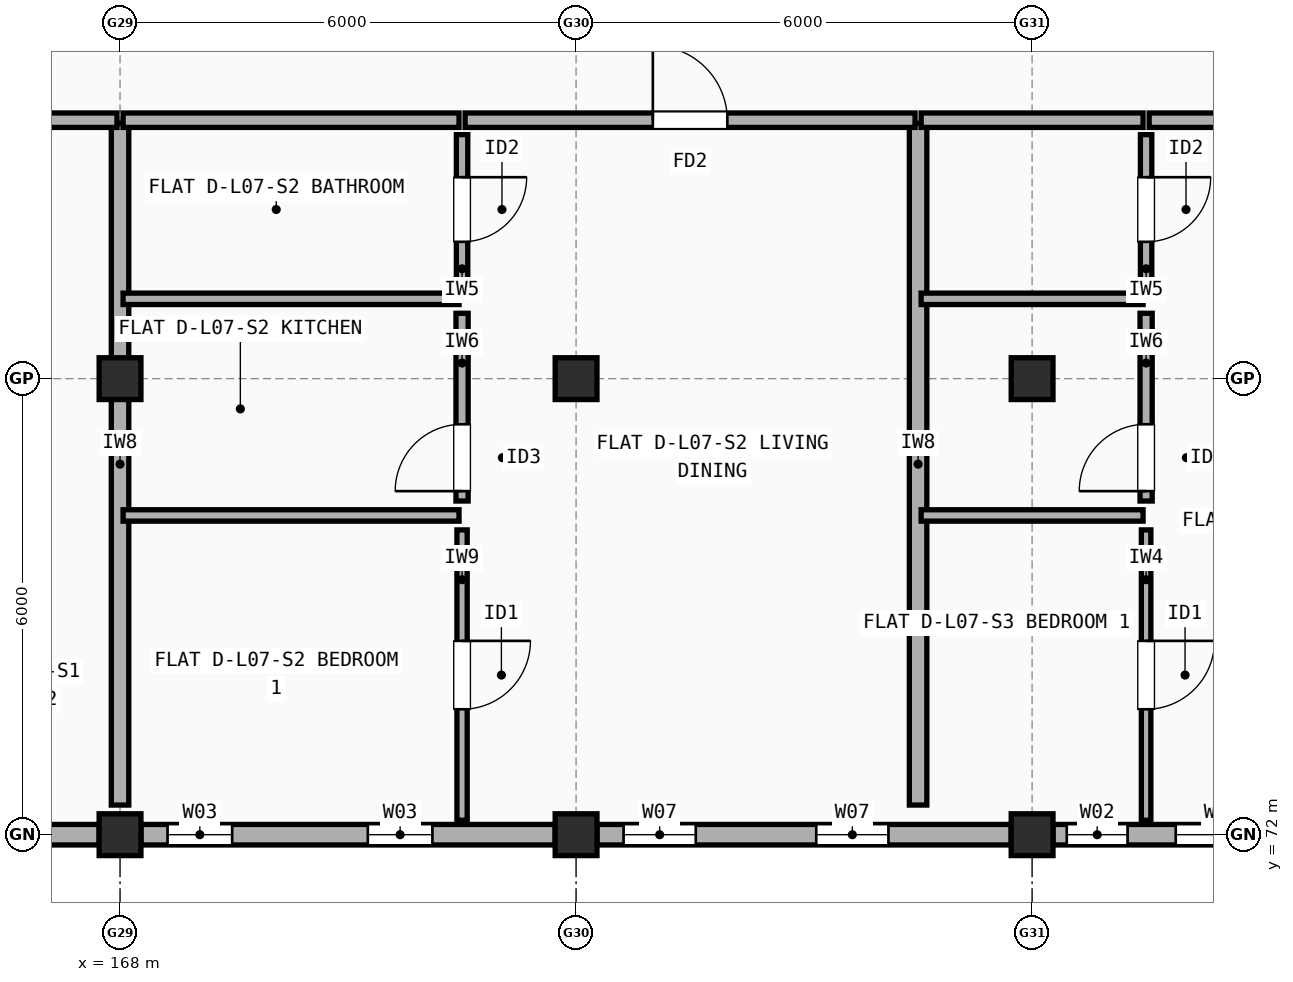
"""IFC4 building model, lengths in metres.
Left out: names, types, materials, properties, quantities, classifications, styles, units other than length and angle.
Written with IfcOpenShell. Run it as: python <this file> out.ifc"""

import sys

from ifc_helpers import new_model, si_unit, direction, frame, frame_2d, origin, origin_2d, place, context, subcontext, project, spatial, rectangle, extrude, element, fill, save


model = new_model("IFC4")
c1 = context("Model", 3, precision=1e-05, world=origin(), true_north=direction((0.0, 1.0)))
c2 = subcontext(c1, "Body", "Model", "MODEL_VIEW")
j1 = project(units=[si_unit("LENGTHUNIT", "METRE"), si_unit("PLANEANGLEUNIT", "RADIAN")], contexts=[c1])
p1 = place(None, origin())
s1 = spatial("IfcSite", under=j1, at=p1, CompositionType="ELEMENT")
p2 = place(p1, origin())
s2 = spatial("IfcBuilding", under=s1, at=p2, CompositionType="ELEMENT")
p3 = place(p2, frame((0.0, 0.0, 23.7)))
s3 = spatial("IfcBuildingStorey", under=s2, at=p3, CompositionType="ELEMENT", Elevation=23.7)
for number, where, z_axis, x_axis in (
    (1, (168.0, 72.0, 0.0), (0.0, 0.0, 1.0), (1.0, 0.0, 0.0)),
    (2, (168.0, 78.0, 0.0), (0.0, 0.0, 1.0), (1.0, 0.0, 0.0)),
    (3, (174.0, 72.0, 0.0), (0.0, 0.0, 1.0), (1.0, 0.0, 0.0)),
    (4, (174.0, 78.0, 0.0), (0.0, 0.0, 1.0), (1.0, 0.0, 0.0)),
    (5, (180.0, 72.0, 0.0), (0.0, 0.0, 1.0), (1.0, 0.0, 0.0)),
    (6, (180.0, 78.0, 0.0), (0.0, 0.0, 1.0), (1.0, 0.0, 0.0)),
):
    element("IfcColumn", number, at=place(p3, frame(where, z_axis=z_axis, x_axis=x_axis)), inside=s3, PredefinedType="COLUMN", context=c2, shape_type="SweptSolid", body=[
        extrude(rectangle(XDim=0.55, YDim=0.55, at=origin_2d()), origin(), (0.0, 0.0, 1.0), 2.975),
    ])
p4 = place(p3, frame((162.275, 72.0, 0.0), z_axis=(0.0, 0.0, 1.0), x_axis=(1.0, 0.0, 0.0)))
e7 = element("IfcWall", 7, at=p4, inside=s3, PredefinedType="STANDARD", context=c2, shape_type="SweptSolid", body=[
    extrude(rectangle(XDim=5.45, YDim=0.27, at=frame_2d((2.725, 0.0))), origin(), (0.0, 0.0, 1.0), 2.457),
])
p5 = place(p4, frame((0.742, 0.0, 0.9)))
e8 = element("IfcOpeningElement", 8, at=p5, cuts=e7, PredefinedType="OPENING", context=c2, shape_type="SweptSolid", body=[
    extrude(rectangle(XDim=1.2, YDim=1.35, at=frame_2d((0.6, 0.675))), frame((0.0, 0.145, 0.0), z_axis=(0.0, -1.0, 0.0), x_axis=(1.0, 0.0, 0.0)), (0.0, 0.0, 1.0), 0.29),
])
p6 = place(p4, frame((3.708, 0.0, 0.9)))
e9 = element("IfcOpeningElement", 9, at=p6, cuts=e7, PredefinedType="OPENING", context=c2, shape_type="SweptSolid", body=[
    extrude(rectangle(XDim=0.8, YDim=1.2, at=frame_2d((0.4, 0.6))), frame((0.0, 0.145, 0.0), z_axis=(0.0, -1.0, 0.0), x_axis=(1.0, 0.0, 0.0)), (0.0, 0.0, 1.0), 0.29),
])
p7 = place(p3, frame((168.275, 72.0, 0.0), z_axis=(0.0, 0.0, 1.0), x_axis=(1.0, 0.0, 0.0)))
e10 = element("IfcWall", 10, at=p7, inside=s3, PredefinedType="STANDARD", context=c2, shape_type="SweptSolid", body=[
    extrude(rectangle(XDim=5.45, YDim=0.27, at=frame_2d((2.725, 0.0))), origin(), (0.0, 0.0, 1.0), 2.457),
])
p8 = place(p7, frame((0.35, 0.0, 0.9)))
e11 = element("IfcOpeningElement", 11, at=p8, cuts=e10, PredefinedType="OPENING", context=c2, shape_type="SweptSolid", body=[
    extrude(rectangle(XDim=0.85, YDim=1.25, at=frame_2d((0.425, 0.625))), frame((0.0, 0.145, 0.0), z_axis=(0.0, -1.0, 0.0), x_axis=(1.0, 0.0, 0.0)), (0.0, 0.0, 1.0), 0.29),
])
p9 = place(p7, frame((2.985, 0.0, 0.9)))
e12 = element("IfcOpeningElement", 12, at=p9, cuts=e10, PredefinedType="OPENING", context=c2, shape_type="SweptSolid", body=[
    extrude(rectangle(XDim=0.85, YDim=1.25, at=frame_2d((0.425, 0.625))), frame((0.0, 0.145, 0.0), z_axis=(0.0, -1.0, 0.0), x_axis=(1.0, 0.0, 0.0)), (0.0, 0.0, 1.0), 0.29),
])
p10 = place(p3, frame((174.275, 72.0, 0.0), z_axis=(0.0, 0.0, 1.0), x_axis=(1.0, 0.0, 0.0)))
e13 = element("IfcWall", 13, at=p10, inside=s3, PredefinedType="STANDARD", context=c2, shape_type="SweptSolid", body=[
    extrude(rectangle(XDim=5.45, YDim=0.27, at=frame_2d((2.725, 0.0))), origin(), (0.0, 0.0, 1.0), 2.457),
])
p11 = place(p10, frame((0.35, 0.0, 0.9)))
e14 = element("IfcOpeningElement", 14, at=p11, cuts=e13, PredefinedType="OPENING", context=c2, shape_type="SweptSolid", body=[
    extrude(rectangle(XDim=0.95, YDim=1.35, at=frame_2d((0.475, 0.675))), frame((0.0, 0.145, 0.0), z_axis=(0.0, -1.0, 0.0), x_axis=(1.0, 0.0, 0.0)), (0.0, 0.0, 1.0), 0.29),
])
p12 = place(p10, frame((2.885, 0.0, 0.9)))
e15 = element("IfcOpeningElement", 15, at=p12, cuts=e13, PredefinedType="OPENING", context=c2, shape_type="SweptSolid", body=[
    extrude(rectangle(XDim=0.95, YDim=1.35, at=frame_2d((0.475, 0.675))), frame((0.0, 0.145, 0.0), z_axis=(0.0, -1.0, 0.0), x_axis=(1.0, 0.0, 0.0)), (0.0, 0.0, 1.0), 0.29),
])
p13 = place(p3, frame((180.275, 72.0, 0.0), z_axis=(0.0, 0.0, 1.0), x_axis=(1.0, 0.0, 0.0)))
e16 = element("IfcWall", 16, at=p13, inside=s3, PredefinedType="STANDARD", context=c2, shape_type="SweptSolid", body=[
    extrude(rectangle(XDim=5.475, YDim=0.27, at=frame_2d((2.738, 0.0))), origin(), (0.0, 0.0, 1.0), 2.457),
])
p14 = place(p13, frame((1.615, 0.0, 0.9)))
e17 = element("IfcOpeningElement", 17, at=p14, cuts=e16, PredefinedType="OPENING", context=c2, shape_type="SweptSolid", body=[
    extrude(rectangle(XDim=1.2, YDim=1.35, at=frame_2d((0.6, 0.675))), frame((0.0, 0.145, 0.0), z_axis=(0.0, -1.0, 0.0), x_axis=(1.0, 0.0, 0.0)), (0.0, 0.0, 1.0), 0.29),
])
p15 = place(p13, frame((3.925, 0.0, 0.9)))
e18 = element("IfcOpeningElement", 18, at=p15, cuts=e16, PredefinedType="OPENING", context=c2, shape_type="SweptSolid", body=[
    extrude(rectangle(XDim=1.2, YDim=1.35, at=frame_2d((0.6, 0.675))), frame((0.0, 0.145, 0.0), z_axis=(0.0, -1.0, 0.0), x_axis=(1.0, 0.0, 0.0)), (0.0, 0.0, 1.0), 0.29),
])
p16 = place(p13, frame((0.181, 0.0, 0.9)))
e19 = element("IfcOpeningElement", 19, at=p16, cuts=e16, PredefinedType="OPENING", context=c2, shape_type="SweptSolid", body=[
    extrude(rectangle(XDim=0.8, YDim=1.2, at=frame_2d((0.4, 0.6))), frame((0.0, 0.145, 0.0), z_axis=(0.0, -1.0, 0.0), x_axis=(1.0, 0.0, 0.0)), (0.0, 0.0, 1.0), 0.29),
])
p17 = place(p3, frame((168.0, 72.39, 0.0), z_axis=(0.0, 0.0, 1.0), x_axis=(0.0, 1.0, 0.0)))
e20 = element("IfcWall", 20, at=p17, inside=s3, PredefinedType="SOLIDWALL", context=c2, shape_type="SweptSolid", body=[
    extrude(rectangle(XDim=8.97, YDim=0.23, at=frame_2d((4.485, 0.0))), origin(), (0.0, 0.0, 1.0), 2.508),
])
p18 = place(p3, frame((165.04, 81.4, 0.0), z_axis=(0.0, 0.0, 1.0), x_axis=(1.0, 0.0, 0.0)))
e21 = element("IfcWall", 21, at=p18, inside=s3, PredefinedType="SOLIDWALL", context=c2, shape_type="SweptSolid", body=[
    extrude(rectangle(XDim=2.92, YDim=0.19, at=frame_2d((1.46, 0.0))), origin(), (0.0, 0.0, 1.0), 2.508),
])
p19 = place(p3, frame((178.5, 72.39, 0.0), z_axis=(0.0, 0.0, 1.0), x_axis=(0.0, 1.0, 0.0)))
e22 = element("IfcWall", 22, at=p19, inside=s3, PredefinedType="SOLIDWALL", context=c2, shape_type="SweptSolid", body=[
    extrude(rectangle(XDim=8.97, YDim=0.23, at=frame_2d((4.485, 0.0))), origin(), (0.0, 0.0, 1.0), 2.457),
])
p20 = place(p3, frame((168.04, 81.4, 0.0), z_axis=(0.0, 0.0, 1.0), x_axis=(1.0, 0.0, 0.0)))
e23 = element("IfcWall", 23, at=p20, inside=s3, PredefinedType="SOLIDWALL", context=c2, shape_type="SweptSolid", body=[
    extrude(rectangle(XDim=4.42, YDim=0.19, at=frame_2d((2.21, 0.0))), origin(), (0.0, 0.0, 1.0), 2.508),
])
p21 = place(p3, frame((172.54, 81.4, 0.0), z_axis=(0.0, 0.0, 1.0), x_axis=(1.0, 0.0, 0.0)))
e24 = element("IfcWall", 24, at=p21, inside=s3, PredefinedType="SOLIDWALL", context=c2, shape_type="SweptSolid", body=[
    extrude(rectangle(XDim=5.92, YDim=0.19, at=frame_2d((2.96, 0.0))), origin(), (0.0, 0.0, 1.0), 2.458),
])
p22 = place(p21, frame((2.47, 0.0, 0.0)))
e25 = element("IfcOpeningElement", 25, at=p22, cuts=e24, PredefinedType="OPENING", context=c2, shape_type="SweptSolid", body=[
    extrude(rectangle(XDim=0.98, YDim=2.15, at=frame_2d((0.49, 1.075))), frame((0.0, 0.105, 0.0), z_axis=(0.0, -1.0, 0.0), x_axis=(1.0, 0.0, 0.0)), (0.0, 0.0, 1.0), 0.21),
])
p23 = place(p3, frame((172.5, 72.19, 0.0), z_axis=(0.0, 0.0, 1.0), x_axis=(0.0, 1.0, 0.0)))
e26 = element("IfcWall", 26, at=p23, inside=s3, PredefinedType="PARTITIONING", context=c2, shape_type="SweptSolid", body=[
    extrude(rectangle(XDim=3.82, YDim=0.135, at=frame_2d((1.91, 0.0))), origin(), (0.0, 0.0, 1.0), 2.975),
])
p24 = place(p23, frame((1.46, 0.0, 0.0)))
e27 = element("IfcOpeningElement", 27, at=p24, cuts=e26, PredefinedType="OPENING", context=c2, shape_type="SweptSolid", body=[
    extrude(rectangle(XDim=0.9, YDim=2.1, at=frame_2d((0.45, 1.05))), frame((0.0, 0.077, 0.0), z_axis=(0.0, -1.0, 0.0), x_axis=(1.0, 0.0, 0.0)), (0.0, 0.0, 1.0), 0.155),
])
p25 = place(p3, frame((172.5, 76.39, 0.0), z_axis=(0.0, 0.0, 1.0), x_axis=(0.0, 1.0, 0.0)))
e28 = element("IfcWall", 28, at=p25, inside=s3, PredefinedType="PLUMBINGWALL", context=c2, shape_type="SweptSolid", body=[
    extrude(rectangle(XDim=2.47, YDim=0.16, at=frame_2d((1.235, 0.0))), origin(), (0.0, 0.0, 1.0), 2.457),
])
p26 = place(p25, frame((0.13, 0.0, 0.0)))
e29 = element("IfcOpeningElement", 29, at=p26, cuts=e28, PredefinedType="OPENING", context=c2, shape_type="SweptSolid", body=[
    extrude(rectangle(XDim=0.88, YDim=2.1, at=frame_2d((0.44, 1.05))), frame((0.0, 0.09, 0.0), z_axis=(0.0, -1.0, 0.0), x_axis=(1.0, 0.0, 0.0)), (0.0, 0.0, 1.0), 0.18),
])
p27 = place(p3, frame((172.5, 79.24, 0.0), z_axis=(0.0, 0.0, 1.0), x_axis=(0.0, 1.0, 0.0)))
e30 = element("IfcWall", 30, at=p27, inside=s3, PredefinedType="PARTITIONING", context=c2, shape_type="SweptSolid", body=[
    extrude(rectangle(XDim=1.97, YDim=0.15, at=frame_2d((0.985, 0.0))), origin(), (0.0, 0.0, 1.0), 2.975),
])
p28 = place(p27, frame((0.56, 0.0, 0.0)))
e31 = element("IfcOpeningElement", 31, at=p28, cuts=e30, PredefinedType="OPENING", context=c2, shape_type="SweptSolid", body=[
    extrude(rectangle(XDim=0.85, YDim=2.1, at=frame_2d((0.425, 1.05))), frame((0.0, 0.085, 0.0), z_axis=(0.0, -1.0, 0.0), x_axis=(1.0, 0.0, 0.0)), (0.0, 0.0, 1.0), 0.17),
])
p29 = place(p3, frame((168.04, 76.2, 0.0), z_axis=(0.0, 0.0, 1.0), x_axis=(1.0, 0.0, 0.0)))
e32 = element("IfcWall", 32, at=p29, inside=s3, PredefinedType="PARTITIONING", context=c2, shape_type="SweptSolid", body=[
    extrude(rectangle(XDim=4.42, YDim=0.15, at=frame_2d((2.21, 0.0))), origin(), (0.0, 0.0, 1.0), 2.548),
])
p30 = place(p3, frame((168.04, 79.05, 0.0), z_axis=(0.0, 0.0, 1.0), x_axis=(1.0, 0.0, 0.0)))
e33 = element("IfcWall", 33, at=p30, inside=s3, PredefinedType="PARTITIONING", context=c2, shape_type="SweptSolid", body=[
    extrude(rectangle(XDim=4.42, YDim=0.15, at=frame_2d((2.21, 0.0))), origin(), (0.0, 0.0, 1.0), 2.508),
])
p31 = place(p3, frame((178.54, 81.4, 0.0), z_axis=(0.0, 0.0, 1.0), x_axis=(1.0, 0.0, 0.0)))
e34 = element("IfcWall", 34, at=p31, inside=s3, PredefinedType="SOLIDWALL", context=c2, shape_type="SweptSolid", body=[
    extrude(rectangle(XDim=2.92, YDim=0.19, at=frame_2d((1.46, 0.0))), origin(), (0.0, 0.0, 1.0), 2.458),
])
p32 = place(p3, frame((181.54, 81.4, 0.0), z_axis=(0.0, 0.0, 1.0), x_axis=(1.0, 0.0, 0.0)))
e35 = element("IfcWall", 35, at=p32, inside=s3, PredefinedType="SOLIDWALL", context=c2, shape_type="SweptSolid", body=[
    extrude(rectangle(XDim=4.42, YDim=0.19, at=frame_2d((2.21, 0.0))), origin(), (0.0, 0.0, 1.0), 2.457),
])
p33 = place(p32, frame((1.685, 0.0, 0.0)))
e36 = element("IfcOpeningElement", 36, at=p33, cuts=e35, PredefinedType="OPENING", context=c2, shape_type="SweptSolid", body=[
    extrude(rectangle(XDim=1.05, YDim=2.15, at=frame_2d((0.525, 1.075))), frame((0.0, 0.105, 0.0), z_axis=(0.0, -1.0, 0.0), x_axis=(1.0, 0.0, 0.0)), (0.0, 0.0, 1.0), 0.21),
])
p34 = place(p3, frame((181.5, 72.19, 0.0), z_axis=(0.0, 0.0, 1.0), x_axis=(0.0, 1.0, 0.0)))
e37 = element("IfcWall", 37, at=p34, inside=s3, PredefinedType="PARTITIONING", context=c2, shape_type="SweptSolid", body=[
    extrude(rectangle(XDim=3.82, YDim=0.125, at=frame_2d((1.91, 0.0))), origin(), (0.0, 0.0, 1.0), 2.975),
])
p35 = place(p34, frame((1.46, 0.0, 0.0)))
e38 = element("IfcOpeningElement", 38, at=p35, cuts=e37, PredefinedType="OPENING", context=c2, shape_type="SweptSolid", body=[
    extrude(rectangle(XDim=0.9, YDim=2.1, at=frame_2d((0.45, 1.05))), frame((0.0, 0.073, 0.0), z_axis=(0.0, -1.0, 0.0), x_axis=(1.0, 0.0, 0.0)), (0.0, 0.0, 1.0), 0.145),
])
p36 = place(p3, frame((181.5, 76.39, 0.0), z_axis=(0.0, 0.0, 1.0), x_axis=(0.0, 1.0, 0.0)))
e39 = element("IfcWall", 39, at=p36, inside=s3, PredefinedType="PLUMBINGWALL", context=c2, shape_type="SweptSolid", body=[
    extrude(rectangle(XDim=2.47, YDim=0.16, at=frame_2d((1.235, 0.0))), origin(), (0.0, 0.0, 1.0), 2.457),
])
p37 = place(p36, frame((0.13, 0.0, 0.0)))
e40 = element("IfcOpeningElement", 40, at=p37, cuts=e39, PredefinedType="OPENING", context=c2, shape_type="SweptSolid", body=[
    extrude(rectangle(XDim=0.88, YDim=2.1, at=frame_2d((0.44, 1.05))), frame((0.0, 0.09, 0.0), z_axis=(0.0, -1.0, 0.0), x_axis=(1.0, 0.0, 0.0)), (0.0, 0.0, 1.0), 0.18),
])
p38 = place(p3, frame((181.5, 79.24, 0.0), z_axis=(0.0, 0.0, 1.0), x_axis=(0.0, 1.0, 0.0)))
e41 = element("IfcWall", 41, at=p38, inside=s3, PredefinedType="PARTITIONING", context=c2, shape_type="SweptSolid", body=[
    extrude(rectangle(XDim=1.97, YDim=0.15, at=frame_2d((0.985, 0.0))), origin(), (0.0, 0.0, 1.0), 2.975),
])
p39 = place(p38, frame((0.56, 0.0, 0.0)))
e42 = element("IfcOpeningElement", 42, at=p39, cuts=e41, PredefinedType="OPENING", context=c2, shape_type="SweptSolid", body=[
    extrude(rectangle(XDim=0.85, YDim=2.1, at=frame_2d((0.425, 1.05))), frame((0.0, 0.085, 0.0), z_axis=(0.0, -1.0, 0.0), x_axis=(1.0, 0.0, 0.0)), (0.0, 0.0, 1.0), 0.17),
])
p40 = place(p3, frame((178.54, 76.2, 0.0), z_axis=(0.0, 0.0, 1.0), x_axis=(1.0, 0.0, 0.0)))
e43 = element("IfcWall", 43, at=p40, inside=s3, PredefinedType="PARTITIONING", context=c2, shape_type="SweptSolid", body=[
    extrude(rectangle(XDim=2.92, YDim=0.15, at=frame_2d((1.46, 0.0))), origin(), (0.0, 0.0, 1.0), 2.508),
])
p41 = place(p3, frame((178.54, 79.05, 0.0), z_axis=(0.0, 0.0, 1.0), x_axis=(1.0, 0.0, 0.0)))
e44 = element("IfcWall", 44, at=p41, inside=s3, PredefinedType="PARTITIONING", context=c2, shape_type="SweptSolid", body=[
    extrude(rectangle(XDim=2.92, YDim=0.15, at=frame_2d((1.46, 0.0))), origin(), (0.0, 0.0, 1.0), 2.458),
])
p42 = place(p8, origin())
e45 = element("IfcWindow", 45, at=p42, inside=s3, PartitioningType="SINGLE_PANEL", PredefinedType="WINDOW", context=c2, shape_type="SweptSolid", body=[
    extrude(rectangle(XDim=0.85, YDim=1.25, at=frame_2d((0.425, 0.625))), frame((0.0, 0.03, 0.0), z_axis=(0.0, -1.0, 0.0), x_axis=(1.0, 0.0, 0.0)), (0.0, 0.0, 1.0), 0.06),
])
fill(e11, e45)
p43 = place(p9, origin())
e46 = element("IfcWindow", 46, at=p43, inside=s3, PartitioningType="SINGLE_PANEL", PredefinedType="WINDOW", context=c2, shape_type="SweptSolid", body=[
    extrude(rectangle(XDim=0.85, YDim=1.25, at=frame_2d((0.425, 0.625))), frame((0.0, 0.03, 0.0), z_axis=(0.0, -1.0, 0.0), x_axis=(1.0, 0.0, 0.0)), (0.0, 0.0, 1.0), 0.06),
])
fill(e12, e46)
p44 = place(p11, origin())
e47 = element("IfcWindow", 47, at=p44, inside=s3, PartitioningType="SINGLE_PANEL", PredefinedType="WINDOW", context=c2, shape_type="SweptSolid", body=[
    extrude(rectangle(XDim=0.95, YDim=1.35, at=frame_2d((0.475, 0.675))), frame((0.0, 0.03, 0.0), z_axis=(0.0, -1.0, 0.0), x_axis=(1.0, 0.0, 0.0)), (0.0, 0.0, 1.0), 0.06),
])
fill(e14, e47)
p45 = place(p12, origin())
e48 = element("IfcWindow", 48, at=p45, inside=s3, PartitioningType="SINGLE_PANEL", PredefinedType="WINDOW", context=c2, shape_type="SweptSolid", body=[
    extrude(rectangle(XDim=0.95, YDim=1.35, at=frame_2d((0.475, 0.675))), frame((0.0, 0.03, 0.0), z_axis=(0.0, -1.0, 0.0), x_axis=(1.0, 0.0, 0.0)), (0.0, 0.0, 1.0), 0.06),
])
fill(e15, e48)
p46 = place(p14, origin())
e49 = element("IfcWindow", 49, at=p46, inside=s3, PartitioningType="SINGLE_PANEL", PredefinedType="WINDOW", context=c2, shape_type="SweptSolid", body=[
    extrude(rectangle(XDim=1.2, YDim=1.35, at=frame_2d((0.6, 0.675))), frame((0.0, 0.03, 0.0), z_axis=(0.0, -1.0, 0.0), x_axis=(1.0, 0.0, 0.0)), (0.0, 0.0, 1.0), 0.06),
])
fill(e17, e49)
p47 = place(p16, origin())
e50 = element("IfcWindow", 50, at=p47, inside=s3, PartitioningType="SINGLE_PANEL", PredefinedType="WINDOW", context=c2, shape_type="SweptSolid", body=[
    extrude(rectangle(XDim=0.8, YDim=1.2, at=frame_2d((0.4, 0.6))), frame((0.0, 0.03, 0.0), z_axis=(0.0, -1.0, 0.0), x_axis=(1.0, 0.0, 0.0)), (0.0, 0.0, 1.0), 0.06),
])
fill(e19, e50)
p48 = place(p22, origin())
e51 = element("IfcDoor", 51, at=p48, inside=s3, OperationType="SINGLE_SWING_LEFT", PredefinedType="DOOR", context=c2, shape_type="SweptSolid", body=[
    extrude(rectangle(XDim=0.98, YDim=2.15, at=frame_2d((0.49, 1.075))), frame((0.0, 0.025, 0.0), z_axis=(0.0, -1.0, 0.0), x_axis=(1.0, 0.0, 0.0)), (0.0, 0.0, 1.0), 0.05),
])
fill(e25, e51)
p49 = place(p24, origin())
e52 = element("IfcDoor", 52, at=p49, inside=s3, OperationType="SINGLE_SWING_RIGHT", PredefinedType="DOOR", context=c2, shape_type="SweptSolid", body=[
    extrude(rectangle(XDim=0.9, YDim=2.1, at=frame_2d((0.45, 1.05))), frame((0.0, 0.025, 0.0), z_axis=(0.0, -1.0, 0.0), x_axis=(1.0, 0.0, 0.0)), (0.0, 0.0, 1.0), 0.05),
])
fill(e27, e52)
p50 = place(p26, origin())
e53 = element("IfcDoor", 53, at=p50, inside=s3, OperationType="SINGLE_SWING_LEFT", PredefinedType="DOOR", context=c2, shape_type="SweptSolid", body=[
    extrude(rectangle(XDim=0.88, YDim=2.1, at=frame_2d((0.44, 1.05))), frame((0.0, 0.025, 0.0), z_axis=(0.0, -1.0, 0.0), x_axis=(1.0, 0.0, 0.0)), (0.0, 0.0, 1.0), 0.05),
])
fill(e29, e53)
p51 = place(p28, origin())
e54 = element("IfcDoor", 54, at=p51, inside=s3, OperationType="SINGLE_SWING_RIGHT", PredefinedType="DOOR", context=c2, shape_type="SweptSolid", body=[
    extrude(rectangle(XDim=0.85, YDim=2.1, at=frame_2d((0.425, 1.05))), frame((0.0, 0.025, 0.0), z_axis=(0.0, -1.0, 0.0), x_axis=(1.0, 0.0, 0.0)), (0.0, 0.0, 1.0), 0.05),
])
fill(e31, e54)
p52 = place(p35, origin())
e55 = element("IfcDoor", 55, at=p52, inside=s3, OperationType="SINGLE_SWING_RIGHT", PredefinedType="DOOR", context=c2, shape_type="SweptSolid", body=[
    extrude(rectangle(XDim=0.9, YDim=2.1, at=frame_2d((0.45, 1.05))), frame((0.0, 0.025, 0.0), z_axis=(0.0, -1.0, 0.0), x_axis=(1.0, 0.0, 0.0)), (0.0, 0.0, 1.0), 0.05),
])
fill(e38, e55)
p53 = place(p37, origin())
e56 = element("IfcDoor", 56, at=p53, inside=s3, OperationType="SINGLE_SWING_LEFT", PredefinedType="DOOR", context=c2, shape_type="SweptSolid", body=[
    extrude(rectangle(XDim=0.88, YDim=2.1, at=frame_2d((0.44, 1.05))), frame((0.0, 0.025, 0.0), z_axis=(0.0, -1.0, 0.0), x_axis=(1.0, 0.0, 0.0)), (0.0, 0.0, 1.0), 0.05),
])
fill(e40, e56)
p54 = place(p39, origin())
e57 = element("IfcDoor", 57, at=p54, inside=s3, OperationType="SINGLE_SWING_RIGHT", PredefinedType="DOOR", context=c2, shape_type="SweptSolid", body=[
    extrude(rectangle(XDim=0.85, YDim=2.1, at=frame_2d((0.425, 1.05))), frame((0.0, 0.025, 0.0), z_axis=(0.0, -1.0, 0.0), x_axis=(1.0, 0.0, 0.0)), (0.0, 0.0, 1.0), 0.05),
])
fill(e42, e57)
save(model, sys.argv[1])
